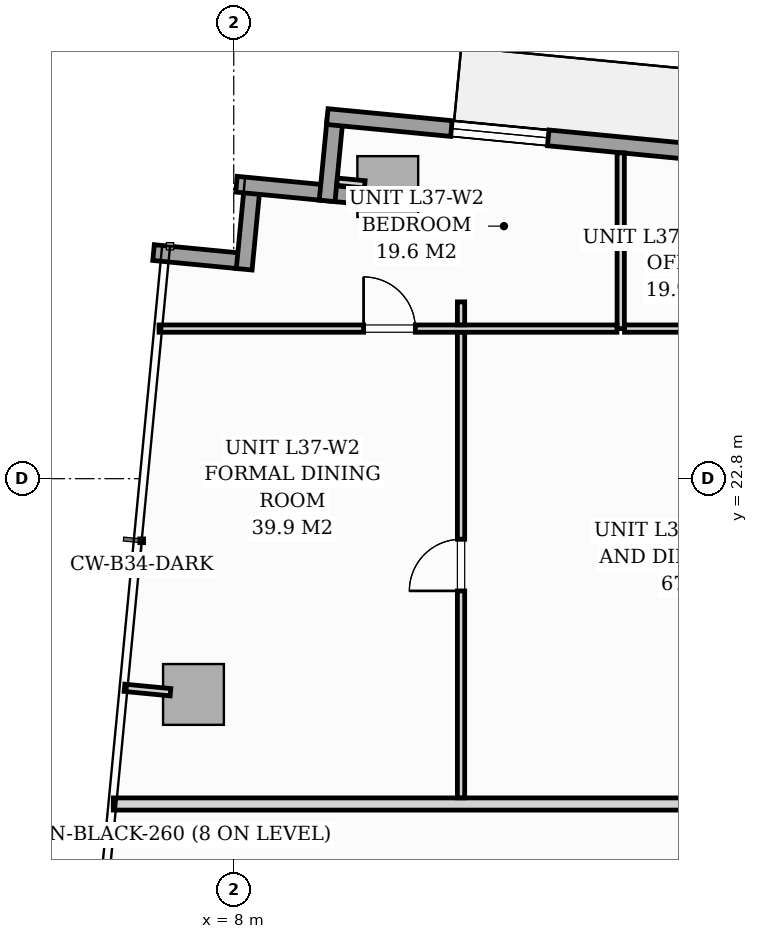
"""IFC4 building model, lengths in metres.
Left out: names, types, materials, properties, quantities, classifications, styles, units other than length and angle.
Written with IfcOpenShell. Run it as: python <this file> out.ifc"""

import sys

from ifc_helpers import new_model, si_unit, direction, frame, frame_2d, origin, origin_2d, place, context, subcontext, project, spatial, rectangle, extrude, source, transform, mapped, element, fill, save


model = new_model("IFC4")
c1 = context("Model", 3, precision=1e-05, world=origin(), true_north=direction((0.0, 1.0)))
c2 = subcontext(c1, "Body", "Model", "MODEL_VIEW")
j1 = project(units=[si_unit("LENGTHUNIT", "METRE"), si_unit("PLANEANGLEUNIT", "RADIAN")], contexts=[c1])
p1 = place(None, origin())
s1 = spatial("IfcSite", under=j1, at=p1, CompositionType="ELEMENT")
p2 = place(p1, origin())
s2 = spatial("IfcBuilding", under=s1, at=p2, CompositionType="ELEMENT")
p3 = place(p2, frame((0.0, 0.0, 131.0)))
s3 = spatial("IfcBuildingStorey", under=s2, at=p3, CompositionType="ELEMENT", Elevation=131.0)
m1 = source(origin(), c2, "Body", "SweptSolid", [
    extrude(rectangle(XDim=1.0, YDim=1.0, at=origin_2d()), origin(), (0.0, 0.0, 1.0), 3.196),
])
for number, where, z_axis, x_axis in (
    (1, (10.533, 27.604, 0.002), (0.0, 0.0, 1.0), (0.995, -0.096, 0.0)),
    (2, (7.338, 19.252, 0.002), (0.0, 0.0, 1.0), (0.995, -0.096, 0.0)),
):
    element("IfcColumn", number, at=place(p3, frame(where, z_axis=z_axis, x_axis=x_axis)), inside=s3, PredefinedType="COLUMN", context=c2, shape_type="MappedRepresentation", body=[
        mapped(m1, transform((0.0, 0.0, 0.0), scale=1.0)),
    ])
p4 = place(p3, frame((6.681, 26.518, 0.0), z_axis=(0.0, 0.0, 1.0), x_axis=(0.995389446633, -0.095915846097, 0.0)))
e3 = element("IfcWall", 3, at=p4, inside=s3, PredefinedType="STANDARD", context=c2, shape_type="SweptSolid", body=[
    extrude(rectangle(XDim=1.395, YDim=0.26, at=frame_2d((0.697, 0.0))), origin(), (0.0, 0.0, 1.0), 2.94),
])
p5 = place(p3, frame((8.172, 26.244, 0.0), z_axis=(0.0, 0.0, 1.0), x_axis=(0.095725744959, 0.99540774648, 0.0)))
e4 = element("IfcWall", 4, at=p5, inside=s3, PredefinedType="STANDARD", context=c2, shape_type="SweptSolid", body=[
    extrude(rectangle(XDim=1.395, YDim=0.26, at=frame_2d((0.698, 0.0))), origin(), (0.0, 0.0, 1.0), 2.94),
])
p6 = place(p3, frame((8.045, 27.643, 0.0), z_axis=(0.0, 0.0, 1.0), x_axis=(0.995391147587, -0.095898192396, 0.0)))
e5 = element("IfcWall", 5, at=p6, inside=s3, PredefinedType="STANDARD", context=c2, shape_type="SweptSolid", body=[
    extrude(rectangle(XDim=1.978, YDim=0.26, at=frame_2d((0.989, 0.0))), origin(), (0.0, 0.0, 1.0), 2.94),
])
p7 = place(p3, frame((9.536, 27.368, 0.0), z_axis=(0.0, 0.0, 1.0), x_axis=(0.095915846097, 0.995389446633, 0.0)))
e6 = element("IfcWall", 6, at=p7, inside=s3, PredefinedType="STANDARD", context=c2, shape_type="SweptSolid", body=[
    extrude(rectangle(XDim=1.395, YDim=0.26, at=frame_2d((0.697, 0.0))), origin(), (0.0, 0.0, 1.0), 2.94),
])
p8 = place(p3, frame((9.539, 28.754, 0.0), z_axis=(0.0, 0.0, 1.0), x_axis=(0.995397345886, -0.09583383433, 0.0)))
e7 = element("IfcWall", 7, at=p8, inside=s3, PredefinedType="STANDARD", context=c2, shape_type="SweptSolid", body=[
    extrude(rectangle(XDim=17.01, YDim=0.26, at=frame_2d((8.505, 0.0))), origin(), (0.0, 0.0, 1.0), 2.94),
])
p9 = place(p8, frame((6.903, 0.0, 0.0)))
e8 = element("IfcOpeningElement", 8, at=p9, cuts=e7, PredefinedType="OPENING", context=c2, shape_type="SweptSolid", body=[
    extrude(rectangle(XDim=1.8, YDim=2.06, at=frame_2d((0.9, 1.03))), frame((0.0, 0.14, 0.0), z_axis=(0.0, -1.0, 0.0), x_axis=(1.0, 0.0, 0.0)), (0.0, 0.0, 1.0), 0.28),
])
p10 = place(p8, frame((2.05, 0.0, 0.65)))
e9 = element("IfcOpeningElement", 9, at=p10, cuts=e7, PredefinedType="OPENING", context=c2, shape_type="SweptSolid", body=[
    extrude(rectangle(XDim=1.6, YDim=1.5, at=frame_2d((0.8, 0.75))), frame((0.0, 0.14, 0.0), z_axis=(0.0, -1.0, 0.0), x_axis=(1.0, 0.0, 0.0)), (0.0, 0.0, 1.0), 0.28),
])
p11 = place(p3, frame((6.019, 17.45, 0.0), z_axis=(0.0, 0.0, 1.0), x_axis=(1.0, 0.0, 0.0)))
e10 = element("IfcWall", 10, at=p11, inside=s3, PredefinedType="PARTITIONING", context=c2, shape_type="SweptSolid", body=[
    extrude(rectangle(XDim=15.949, YDim=0.2, at=frame_2d((7.975, 0.0))), origin(), (0.0, 0.0, 1.0), 2.94),
])
p12 = place(p3, frame((14.364, 25.268, 0.0), z_axis=(0.0, 0.0, 1.0), x_axis=(0.0, 1.0, 0.0)))
e11 = element("IfcWall", 11, at=p12, inside=s3, PredefinedType="PARTITIONING", context=c2, shape_type="SweptSolid", body=[
    extrude(rectangle(XDim=2.889, YDim=0.12, at=frame_2d((1.445, 0.0))), origin(), (0.0, 0.0, 1.0), 2.94),
])
p13 = place(p3, frame((6.772, 25.268, 0.0), z_axis=(0.0, 0.0, 1.0), x_axis=(1.0, 0.0, 0.0)))
e12 = element("IfcWall", 12, at=p13, inside=s3, PredefinedType="PARTITIONING", context=c2, shape_type="SweptSolid", body=[
    extrude(rectangle(XDim=7.53, YDim=0.12, at=frame_2d((3.765, 0.0))), origin(), (0.0, 0.0, 1.0), 2.94),
])
p14 = place(p13, frame((3.364, 0.0, 0.0)))
e13 = element("IfcOpeningElement", 13, at=p14, cuts=e12, PredefinedType="OPENING", context=c2, shape_type="SweptSolid", body=[
    extrude(rectangle(XDim=0.85, YDim=2.05, at=frame_2d((0.425, 1.025))), frame((0.0, 0.07, 0.0), z_axis=(0.0, -1.0, 0.0), x_axis=(1.0, 0.0, 0.0)), (0.0, 0.0, 1.0), 0.14),
])
p15 = place(p3, frame((14.426, 25.268, 0.0), z_axis=(0.0, 0.0, 1.0), x_axis=(1.0, 0.0, 0.0)))
e14 = element("IfcWall", 14, at=p15, inside=s3, PredefinedType="PARTITIONING", context=c2, shape_type="SweptSolid", body=[
    extrude(rectangle(XDim=7.542, YDim=0.12, at=frame_2d((3.771, 0.0))), origin(), (0.0, 0.0, 1.0), 2.94),
])
p16 = place(p15, frame((3.316, 0.0, 0.0)))
e15 = element("IfcOpeningElement", 15, at=p16, cuts=e14, PredefinedType="OPENING", context=c2, shape_type="SweptSolid", body=[
    extrude(rectangle(XDim=0.85, YDim=2.05, at=frame_2d((0.425, 1.025))), frame((0.0, 0.07, 0.0), z_axis=(0.0, -1.0, 0.0), x_axis=(1.0, 0.0, 0.0)), (0.0, 0.0, 1.0), 0.14),
])
p17 = place(p3, frame((11.738, 17.552, 0.0), z_axis=(0.0, 0.0, 1.0), x_axis=(0.0, 1.0, 0.0)))
e16 = element("IfcWall", 16, at=p17, inside=s3, PredefinedType="PARTITIONING", context=c2, shape_type="SweptSolid", body=[
    extrude(rectangle(XDim=7.654, YDim=0.12, at=frame_2d((3.827, 0.0))), origin(), (0.0, 0.0, 1.0), 2.94),
])
p18 = place(p17, frame((3.402, 0.0, 0.0)))
e17 = element("IfcOpeningElement", 17, at=p18, cuts=e16, PredefinedType="OPENING", context=c2, shape_type="SweptSolid", body=[
    extrude(rectangle(XDim=0.85, YDim=2.05, at=frame_2d((0.425, 1.025))), frame((0.0, 0.07, 0.0), z_axis=(0.0, -1.0, 0.0), x_axis=(1.0, 0.0, 0.0)), (0.0, 0.0, 1.0), 0.14),
])
p19 = place(p3, frame((11.738, 25.33, 0.0), z_axis=(0.0, 0.0, 1.0), x_axis=(0.0, 1.0, 0.0)))
e18 = element("IfcWall", 18, at=p19, inside=s3, PredefinedType="PARTITIONING", context=c2, shape_type="SweptSolid", body=[
    extrude(rectangle(XDim=0.378, YDim=0.12, at=frame_2d((0.189, 0.0))), origin(), (0.0, 0.0, 1.0), 2.94),
])
p20 = place(p3, frame((10.155, 27.64, 0.0), z_axis=(0.0, 0.0, 1.0), x_axis=(-0.995435366701, 0.095438098896, 0.0)))
e19 = element("IfcWall", 19, at=p20, inside=s3, PredefinedType="PARTITIONING", context=c2, shape_type="SweptSolid", body=[
    extrude(rectangle(XDim=0.458, YDim=0.12, at=frame_2d((0.229, 0.0))), origin(), (0.0, 0.0, 1.0), 2.94),
])
p21 = place(p3, frame((6.959, 19.288, 0.0), z_axis=(0.0, 0.0, 1.0), x_axis=(-0.995377786728, 0.096036772582, 0.0)))
e20 = element("IfcWall", 20, at=p21, inside=s3, PredefinedType="PARTITIONING", context=c2, shape_type="SweptSolid", body=[
    extrude(rectangle(XDim=0.76, YDim=0.12, at=frame_2d((0.38, 0.0))), origin(), (0.0, 0.0, 1.0), 2.94),
])
m2 = source(origin(), c2, "Body", "SweptSolid", [
    extrude(rectangle(XDim=1.6, YDim=1.5, at=frame_2d((0.8, 0.75))), frame((0.0, 0.03, 0.0), z_axis=(0.0, -1.0, 0.0), x_axis=(1.0, 0.0, 0.0)), (0.0, 0.0, 1.0), 0.06),
])
p22 = place(p10, origin())
e21 = element("IfcWindow", 21, at=p22, inside=s3, PartitioningType="SINGLE_PANEL", PredefinedType="WINDOW", context=c2, shape_type="MappedRepresentation", body=[
    mapped(m2, transform((0.0, 0.0, 0.0), scale=1.0)),
])
fill(e9, e21)
m3 = source(origin(), c2, "Body", "SweptSolid", [
    extrude(rectangle(XDim=0.85, YDim=2.05, at=frame_2d((0.425, 1.025))), frame((0.0, 0.025, 0.0), z_axis=(0.0, -1.0, 0.0), x_axis=(1.0, 0.0, 0.0)), (0.0, 0.0, 1.0), 0.05),
])
p23 = place(p14, origin())
e22 = element("IfcDoor", 22, at=p23, inside=s3, OperationType="SINGLE_SWING_LEFT", PredefinedType="DOOR", context=c2, shape_type="MappedRepresentation", body=[
    mapped(m3, transform((0.0, 0.0, 0.0), scale=1.0)),
])
fill(e13, e22)
p24 = place(p18, origin())
e23 = element("IfcDoor", 23, at=p24, inside=s3, OperationType="SINGLE_SWING_LEFT", PredefinedType="DOOR", context=c2, shape_type="MappedRepresentation", body=[
    mapped(m3, transform((0.0, 0.0, 0.0), scale=1.0)),
])
fill(e17, e23)
save(model, sys.argv[1])
